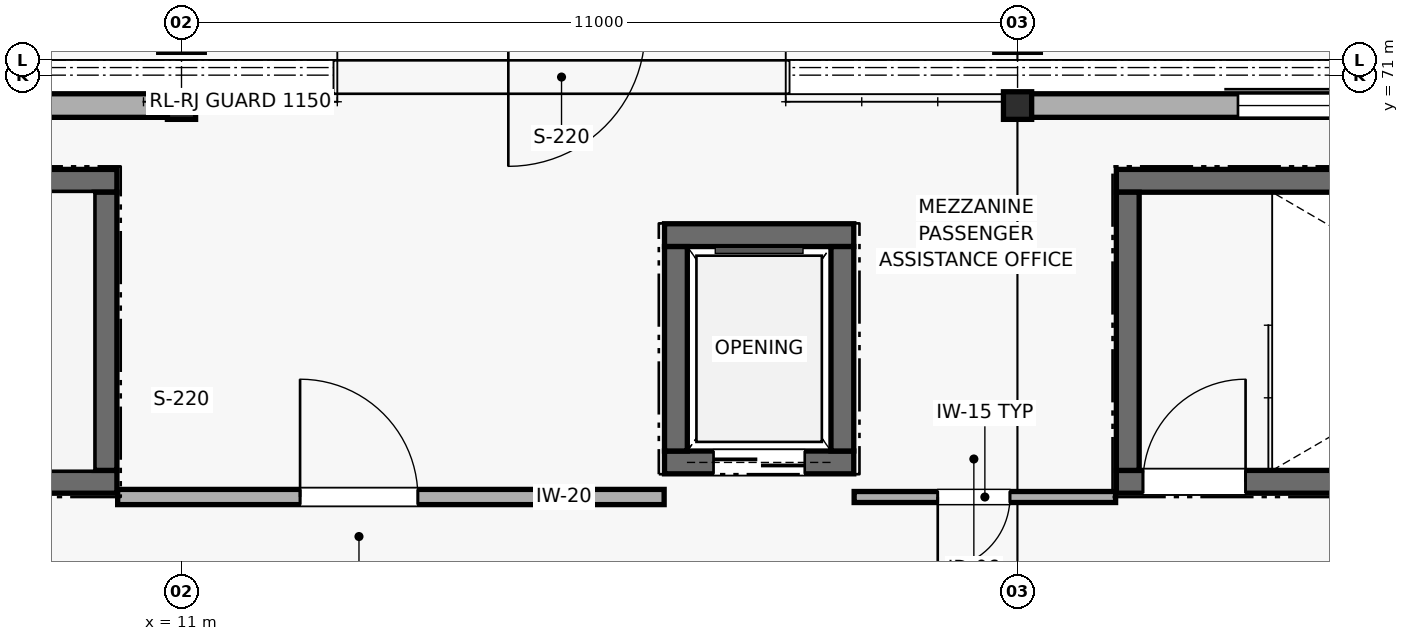
"""IFC4 building model, lengths in metres.
Left out: names, types, materials, properties, quantities, classifications, styles, units other than length and angle.
Written with IfcOpenShell. Run it as: python <this file> out.ifc"""

import sys

from ifc_helpers import new_model, si_unit, direction, frame, frame_2d, origin, origin_2d, place, context, subcontext, project, spatial, rectangle, i_section, extrude, element, fill, save


model = new_model("IFC4")
c1 = context("Model", 3, precision=1e-05, world=origin(), true_north=direction((0.0, 1.0)))
c2 = subcontext(c1, "Body", "Model", "MODEL_VIEW")
j1 = project(units=[si_unit("LENGTHUNIT", "METRE"), si_unit("PLANEANGLEUNIT", "RADIAN")], contexts=[c1])
p1 = place(None, origin())
s1 = spatial("IfcSite", under=j1, at=p1, CompositionType="ELEMENT")
p2 = place(p1, origin())
s2 = spatial("IfcBuilding", under=s1, at=p2, CompositionType="ELEMENT")
p3 = place(p2, frame((0.0, 0.0, 9.9)))
s3 = spatial("IfcBuildingStorey", under=s2, at=p3, CompositionType="ELEMENT", Elevation=9.9)
for number, where, z_axis, x_axis in (
    (1, (11.0, 70.6, 0.0), (0.0, 0.0, 1.0), (1.0, 0.0, 0.0)),
    (2, (22.0, 70.6, 0.0), (0.0, 0.0, 1.0), (1.0, 0.0, 0.0)),
):
    element("IfcColumn", number, at=place(p3, frame(where, z_axis=z_axis, x_axis=x_axis)), inside=s3, PredefinedType="COLUMN", context=c2, shape_type="SweptSolid", body=[
        extrude(i_section(OverallWidth=0.371, OverallDepth=0.363, WebThickness=0.013, FlangeThickness=0.022, FilletRadius=0.018, at=origin_2d()), origin(), (0.0, 0.0, 1.0), 4.2),
    ])
p4 = place(p3, frame((10.995, 70.6, 0.0), z_axis=(0.0, 0.0, 1.0), x_axis=(-1.0, 0.0, 0.0)))
e3 = element("IfcWall", 3, at=p4, inside=s3, PredefinedType="SOLIDWALL", context=c2, shape_type="SweptSolid", body=[
    extrude(rectangle(XDim=10.991, YDim=0.31, at=frame_2d((5.495, 0.0))), origin(), (0.0, 0.0, 1.0), 3.292),
])
p5 = place(p4, frame((2.595, 0.0, 1.05)))
e4 = element("IfcOpeningElement", 4, at=p5, cuts=e3, PredefinedType="OPENING", context=c2, shape_type="SweptSolid", body=[
    extrude(rectangle(XDim=1.8, YDim=1.8, at=frame_2d((0.9, 0.9))), frame((0.0, 0.165, 0.0), z_axis=(0.0, -1.0, 0.0), x_axis=(1.0, 0.0, 0.0)), (0.0, 0.0, 1.0), 0.33),
])
p6 = place(p4, frame((6.295, 0.0, 1.05)))
e5 = element("IfcOpeningElement", 5, at=p6, cuts=e3, PredefinedType="OPENING", context=c2, shape_type="SweptSolid", body=[
    extrude(rectangle(XDim=1.8, YDim=1.8, at=frame_2d((0.9, 0.9))), frame((0.0, 0.165, 0.0), z_axis=(0.0, -1.0, 0.0), x_axis=(1.0, 0.0, 0.0)), (0.0, 0.0, 1.0), 0.33),
])
p7 = place(p3, frame((32.995, 70.6, 0.0), z_axis=(0.0, 0.0, 1.0), x_axis=(-1.0, 0.0, 0.0)))
e6 = element("IfcWall", 6, at=p7, inside=s3, PredefinedType="SOLIDWALL", context=c2, shape_type="SweptSolid", body=[
    extrude(rectangle(XDim=10.991, YDim=0.31, at=frame_2d((5.495, 0.0))), origin(), (0.0, 0.0, 1.0), 3.302),
])
p8 = place(p7, frame((2.595, 0.0, 1.05)))
e7 = element("IfcOpeningElement", 7, at=p8, cuts=e6, PredefinedType="OPENING", context=c2, shape_type="SweptSolid", body=[
    extrude(rectangle(XDim=1.8, YDim=1.8, at=frame_2d((0.9, 0.9))), frame((0.0, 0.165, 0.0), z_axis=(0.0, -1.0, 0.0), x_axis=(1.0, 0.0, 0.0)), (0.0, 0.0, 1.0), 0.33),
])
p9 = place(p7, frame((6.295, 0.0, 1.05)))
e8 = element("IfcOpeningElement", 8, at=p9, cuts=e6, PredefinedType="OPENING", context=c2, shape_type="SweptSolid", body=[
    extrude(rectangle(XDim=1.8, YDim=1.8, at=frame_2d((0.9, 0.9))), frame((0.0, 0.165, 0.0), z_axis=(0.0, -1.0, 0.0), x_axis=(1.0, 0.0, 0.0)), (0.0, 0.0, 1.0), 0.33),
])
p10 = place(p3, frame((1.5, 65.65, 0.0), z_axis=(0.0, 0.0, 1.0), x_axis=(1.0, 0.0, 0.0)))
e9 = element("IfcWall", 9, at=p10, inside=s3, PredefinedType="SHEAR", context=c2, shape_type="SweptSolid", body=[
    extrude(rectangle(XDim=8.65, YDim=0.3, at=frame_2d((4.325, 0.0))), origin(), (0.0, 0.0, 1.0), 3.98),
])
p11 = place(p10, frame((0.55, 0.0, 0.0)))
e10 = element("IfcOpeningElement", 10, at=p11, cuts=e9, PredefinedType="OPENING", context=c2, shape_type="SweptSolid", body=[
    extrude(rectangle(XDim=1.35, YDim=2.2, at=frame_2d((0.675, 1.1))), frame((0.0, 0.16, 0.0), z_axis=(0.0, -1.0, 0.0), x_axis=(1.0, 0.0, 0.0)), (0.0, 0.0, 1.0), 0.32),
])
p12 = place(p3, frame((10.15, 69.61, 0.0), z_axis=(0.0, 0.0, 1.0), x_axis=(-1.0, 0.0, 0.0)))
e11 = element("IfcWall", 11, at=p12, inside=s3, PredefinedType="SHEAR", context=c2, shape_type="SweptSolid", body=[
    extrude(rectangle(XDim=8.65, YDim=0.3, at=frame_2d((4.325, 0.0))), origin(), (0.0, 0.0, 1.0), 3.98),
])
p13 = place(p3, frame((10.0, 65.8, 0.0), z_axis=(0.0, 0.0, 1.0), x_axis=(0.0, 1.0, 0.0)))
e12 = element("IfcWall", 12, at=p13, inside=s3, PredefinedType="SHEAR", context=c2, shape_type="SweptSolid", body=[
    extrude(rectangle(XDim=3.66, YDim=0.3, at=frame_2d((1.83, 0.0))), origin(), (0.0, 0.0, 1.0), 3.98),
])
p14 = place(p3, frame((23.3, 65.65, 0.0), z_axis=(0.0, 0.0, 1.0), x_axis=(1.0, 0.0, 0.0)))
e13 = element("IfcWall", 13, at=p14, inside=s3, PredefinedType="SHEAR", context=c2, shape_type="SweptSolid", body=[
    extrude(rectangle(XDim=8.65, YDim=0.3, at=frame_2d((4.325, 0.0))), origin(), (0.0, 0.0, 1.0), 3.99),
])
p15 = place(p14, frame((0.35, 0.0, 0.0)))
e14 = element("IfcOpeningElement", 14, at=p15, cuts=e13, PredefinedType="OPENING", context=c2, shape_type="SweptSolid", body=[
    extrude(rectangle(XDim=1.35, YDim=2.2, at=frame_2d((0.675, 1.1))), frame((0.0, 0.16, 0.0), z_axis=(0.0, -1.0, 0.0), x_axis=(1.0, 0.0, 0.0)), (0.0, 0.0, 1.0), 0.32),
])
p16 = place(p3, frame((31.95, 69.61, 0.0), z_axis=(0.0, 0.0, 1.0), x_axis=(-1.0, 0.0, 0.0)))
e15 = element("IfcWall", 15, at=p16, inside=s3, PredefinedType="SHEAR", context=c2, shape_type="SweptSolid", body=[
    extrude(rectangle(XDim=8.65, YDim=0.3, at=frame_2d((4.325, 0.0))), origin(), (0.0, 0.0, 1.0), 3.99),
])
p17 = place(p3, frame((23.45, 69.46, 0.0), z_axis=(0.0, 0.0, 1.0), x_axis=(0.0, -1.0, 0.0)))
e16 = element("IfcWall", 16, at=p17, inside=s3, PredefinedType="SHEAR", context=c2, shape_type="SweptSolid", body=[
    extrude(rectangle(XDim=3.66, YDim=0.3, at=frame_2d((1.83, 0.0))), origin(), (0.0, 0.0, 1.0), 3.99),
])
p18 = place(p3, frame((17.355, 65.905, 0.0), z_axis=(0.0, 0.0, 1.0), x_axis=(1.0, 0.0, 0.0)))
e17 = element("IfcWall", 17, at=p18, inside=s3, PredefinedType="SHEAR", context=c2, shape_type="SweptSolid", body=[
    extrude(rectangle(XDim=2.49, YDim=0.3, at=frame_2d((1.245, 0.0))), origin(), (0.0, 0.0, 1.0), 3.98),
])
p19 = place(p18, frame((0.645, 0.0, 0.0)))
e18 = element("IfcOpeningElement", 18, at=p19, cuts=e17, PredefinedType="OPENING", context=c2, shape_type="SweptSolid", body=[
    extrude(rectangle(XDim=1.2, YDim=2.15, at=frame_2d((0.6, 1.075))), frame((0.0, 0.16, 0.0), z_axis=(0.0, -1.0, 0.0), x_axis=(1.0, 0.0, 0.0)), (0.0, 0.0, 1.0), 0.32),
])
p20 = place(p3, frame((19.845, 68.895, 0.0), z_axis=(0.0, 0.0, 1.0), x_axis=(-1.0, 0.0, 0.0)))
e19 = element("IfcWall", 19, at=p20, inside=s3, PredefinedType="SHEAR", context=c2, shape_type="SweptSolid", body=[
    extrude(rectangle(XDim=2.49, YDim=0.3, at=frame_2d((1.245, 0.0))), origin(), (0.0, 0.0, 1.0), 3.98),
])
for number, where, z_axis, x_axis in (
    (20, (17.505, 68.745, 0.0), (0.0, 0.0, 1.0), (0.0, -1.0, 0.0)),
    (21, (19.695, 66.055, 0.0), (0.0, 0.0, 1.0), (0.0, 1.0, 0.0)),
):
    element("IfcWall", number, at=place(p3, frame(where, z_axis=z_axis, x_axis=x_axis)), inside=s3, PredefinedType="SHEAR", context=c2, shape_type="SweptSolid", body=[
        extrude(rectangle(XDim=2.69, YDim=0.3, at=frame_2d((1.345, 0.0))), origin(), (0.0, 0.0, 1.0), 3.98),
    ])
p21 = place(p3, frame((10.16, 65.45, 0.0), z_axis=(0.0, 0.0, 1.0), x_axis=(1.0, 0.0, 0.0)))
e22 = element("IfcWall", 22, at=p21, inside=s3, PredefinedType="PARTITIONING", context=c2, shape_type="SweptSolid", body=[
    extrude(rectangle(XDim=7.19, YDim=0.2, at=frame_2d((3.595, 0.0))), origin(), (0.0, 0.0, 1.0), 3.98),
])
p22 = place(p21, frame((2.4, 0.0, 0.0)))
e23 = element("IfcOpeningElement", 23, at=p22, cuts=e22, PredefinedType="OPENING", context=c2, shape_type="SweptSolid", body=[
    extrude(rectangle(XDim=1.55, YDim=2.3, at=frame_2d((0.775, 1.15))), frame((0.0, 0.11, 0.0), z_axis=(0.0, -1.0, 0.0), x_axis=(1.0, 0.0, 0.0)), (0.0, 0.0, 1.0), 0.22),
])
p23 = place(p3, frame((19.85, 65.45, 0.0), z_axis=(0.0, 0.0, 1.0), x_axis=(1.0, 0.0, 0.0)))
e24 = element("IfcWall", 24, at=p23, inside=s3, PredefinedType="PARTITIONING", context=c2, shape_type="SweptSolid", body=[
    extrude(rectangle(XDim=3.44, YDim=0.145, at=frame_2d((1.72, 0.0))), origin(), (0.0, 0.0, 1.0), 3.98),
])
p24 = place(p23, frame((1.1, 0.0, 0.0)))
e25 = element("IfcOpeningElement", 25, at=p24, cuts=e24, PredefinedType="OPENING", context=c2, shape_type="SweptSolid", body=[
    extrude(rectangle(XDim=0.95, YDim=2.15, at=frame_2d((0.475, 1.075))), frame((0.0, 0.083, 0.0), z_axis=(0.0, -1.0, 0.0), x_axis=(1.0, 0.0, 0.0)), (0.0, 0.0, 1.0), 0.165),
])
p25 = place(p9, origin())
e26 = element("IfcWindow", 26, at=p25, inside=s3, PartitioningType="SINGLE_PANEL", PredefinedType="WINDOW", context=c2, shape_type="SweptSolid", body=[
    extrude(rectangle(XDim=1.8, YDim=1.8, at=frame_2d((0.9, 0.9))), frame((0.0, 0.03, 0.0), z_axis=(0.0, -1.0, 0.0), x_axis=(1.0, 0.0, 0.0)), (0.0, 0.0, 1.0), 0.06),
])
fill(e8, e26)
p26 = place(p15, origin())
e27 = element("IfcDoor", 27, at=p26, inside=s3, OperationType="SINGLE_SWING_RIGHT", PredefinedType="DOOR", context=c2, shape_type="SweptSolid", body=[
    extrude(rectangle(XDim=1.35, YDim=2.2, at=frame_2d((0.675, 1.1))), frame((0.0, 0.025, 0.0), z_axis=(0.0, -1.0, 0.0), x_axis=(1.0, 0.0, 0.0)), (0.0, 0.0, 1.0), 0.05),
])
fill(e14, e27)
p27 = place(p19, frame((1.2, 0.0, 0.0), z_axis=(0.0, 0.0, 1.0), x_axis=(-1.0, 0.0, 0.0)))
e28 = element("IfcDoor", 28, at=p27, inside=s3, OperationType="DOUBLE_DOOR_SLIDING", PredefinedType="DOOR", context=c2, shape_type="SweptSolid", body=[
    extrude(rectangle(XDim=1.2, YDim=2.15, at=frame_2d((0.6, 1.075))), frame((0.0, 0.025, 0.0), z_axis=(0.0, -1.0, 0.0), x_axis=(1.0, 0.0, 0.0)), (0.0, 0.0, 1.0), 0.05),
])
fill(e18, e28)
p28 = place(p22, origin())
e29 = element("IfcDoor", 29, at=p28, inside=s3, OperationType="SINGLE_SWING_LEFT", PredefinedType="DOOR", context=c2, shape_type="SweptSolid", body=[
    extrude(rectangle(XDim=1.55, YDim=2.3, at=frame_2d((0.775, 1.15))), frame((0.0, 0.025, 0.0), z_axis=(0.0, -1.0, 0.0), x_axis=(1.0, 0.0, 0.0)), (0.0, 0.0, 1.0), 0.05),
])
fill(e23, e29)
p29 = place(p24, frame((0.95, 0.0, 0.0), z_axis=(0.0, 0.0, 1.0), x_axis=(-1.0, 0.0, 0.0)))
e30 = element("IfcDoor", 30, at=p29, inside=s3, OperationType="SINGLE_SWING_RIGHT", PredefinedType="DOOR", context=c2, shape_type="SweptSolid", body=[
    extrude(rectangle(XDim=0.95, YDim=2.15, at=frame_2d((0.475, 1.075))), frame((0.0, 0.025, 0.0), z_axis=(0.0, -1.0, 0.0), x_axis=(1.0, 0.0, 0.0)), (0.0, 0.0, 1.0), 0.05),
])
fill(e25, e30)
save(model, sys.argv[1])
